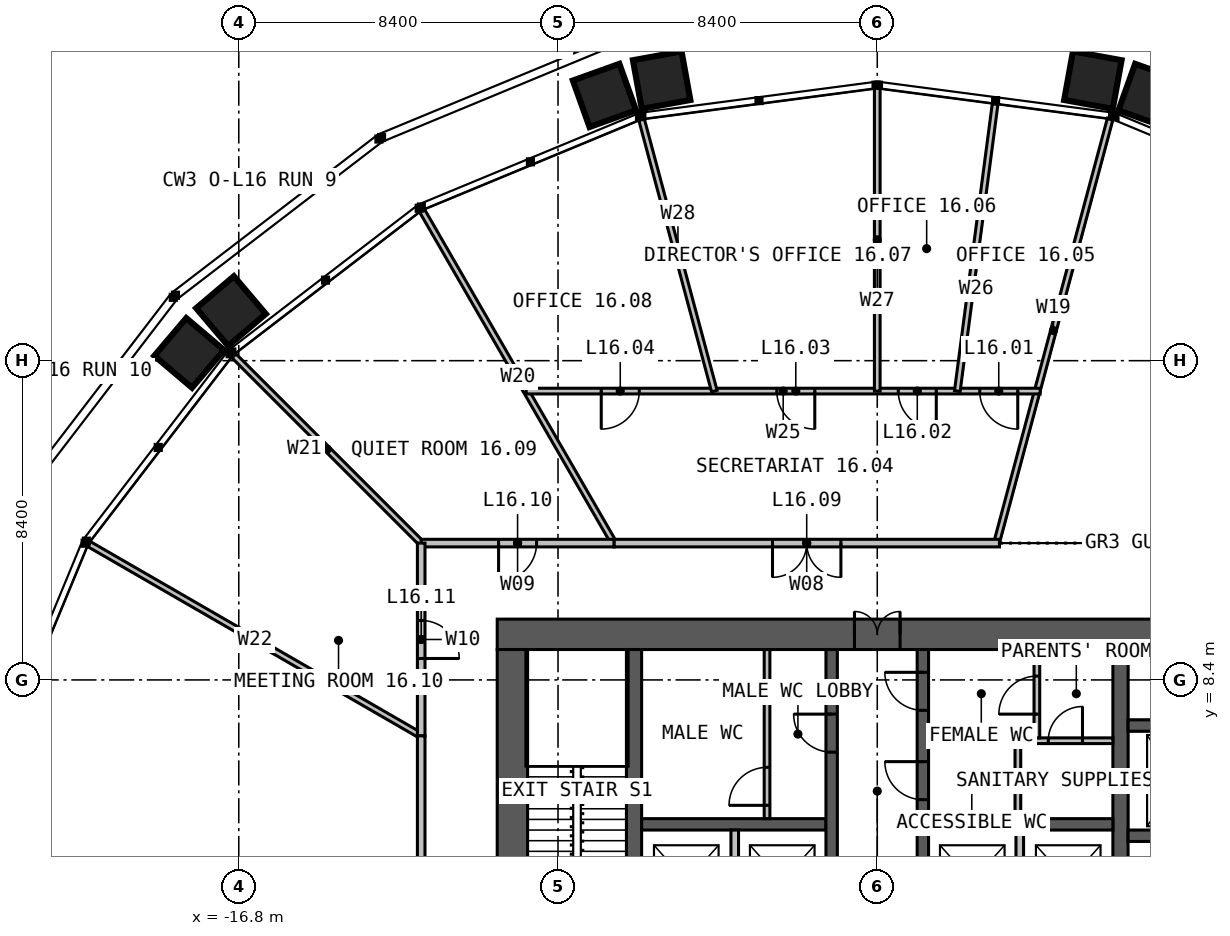
"""IFC4 building model, lengths in metres.
Left out: names, types, materials, properties, quantities, classifications, styles, units other than length and angle.
Written with IfcOpenShell. Run it as: python <this file> out.ifc"""

import sys

from ifc_helpers import new_model, si_unit, direction, frame, frame_2d, origin, place, context, subcontext, project, spatial, rectangle, extrude, element, fill, save


model = new_model("IFC4")
c1 = context("Model", 3, precision=1e-05, world=origin(), true_north=direction((0.0, 1.0)))
c2 = subcontext(c1, "Body", "Model", "MODEL_VIEW")
j1 = project(units=[si_unit("LENGTHUNIT", "METRE"), si_unit("PLANEANGLEUNIT", "RADIAN")], contexts=[c1])
p1 = place(None, origin())
s1 = spatial("IfcSite", under=j1, at=p1, CompositionType="ELEMENT")
p2 = place(p1, origin())
s2 = spatial("IfcBuilding", under=s1, at=p2, CompositionType="ELEMENT")
p3 = place(p2, frame((0.0, 0.0, 69.0)))
s3 = spatial("IfcBuildingStorey", under=s2, at=p3, CompositionType="ELEMENT", Elevation=69.0)
p4 = place(p3, frame((-10.0, 9.6, 0.0), z_axis=(0.0, 0.0, 1.0), x_axis=(1.0, 0.0, 0.0)))
e1 = element("IfcWall", 1, at=p4, inside=s3, PredefinedType="SOLIDWALL", context=c2, shape_type="SweptSolid", body=[
    extrude(rectangle(XDim=20.0, YDim=0.8, at=frame_2d((10.0, 0.0))), origin(), (0.0, 0.0, 1.0), 4.0),
])
p5 = place(p4, frame((9.4, 0.0, 0.0)))
e2 = element("IfcOpeningElement", 2, at=p5, cuts=e1, PredefinedType="OPENING", context=c2, shape_type="SweptSolid", body=[
    extrude(rectangle(XDim=1.2, YDim=2.2, at=frame_2d((0.6, 1.1))), frame((0.0, 0.41, 0.0), z_axis=(0.0, -1.0, 0.0), x_axis=(1.0, 0.0, 0.0)), (0.0, 0.0, 1.0), 0.82),
])
p6 = place(p3, frame((-9.6, 9.2, 0.0), z_axis=(0.0, 0.0, 1.0), x_axis=(0.0, -1.0, 0.0)))
e3 = element("IfcWall", 3, at=p6, inside=s3, PredefinedType="SOLIDWALL", context=c2, shape_type="SweptSolid", body=[
    extrude(rectangle(XDim=18.4, YDim=0.8, at=frame_2d((9.2, 0.0))), origin(), (0.0, 0.0, 1.0), 4.0),
])
p7 = place(p3, frame((-6.4, -9.2, 0.0), z_axis=(0.0, 0.0, 1.0), x_axis=(0.0, 1.0, 0.0)))
e4 = element("IfcWall", 4, at=p7, inside=s3, PredefinedType="SOLIDWALL", context=c2, shape_type="SweptSolid", body=[
    extrude(rectangle(XDim=18.4, YDim=0.4, at=frame_2d((9.2, 0.0))), origin(), (0.0, 0.0, 1.0), 4.0),
])
p8 = place(p7, frame((8.7, 0.0, 0.0)))
e5 = element("IfcOpeningElement", 5, at=p8, cuts=e4, PredefinedType="OPENING", context=c2, shape_type="SweptSolid", body=[
    extrude(rectangle(XDim=1.0, YDim=2.2, at=frame_2d((0.5, 1.1))), frame((0.0, 0.21, 0.0), z_axis=(0.0, -1.0, 0.0), x_axis=(1.0, 0.0, 0.0)), (0.0, 0.0, 1.0), 0.42),
])
p9 = place(p3, frame((6.4, 9.2, 0.0), z_axis=(0.0, 0.0, 1.0), x_axis=(0.0, -1.0, 0.0)))
e6 = element("IfcWall", 6, at=p9, inside=s3, PredefinedType="SOLIDWALL", context=c2, shape_type="SweptSolid", body=[
    extrude(rectangle(XDim=18.4, YDim=0.4, at=frame_2d((9.2, 0.0))), origin(), (0.0, 0.0, 1.0), 4.0),
])
p10 = place(p9, frame((8.7, 0.0, 0.0)))
e7 = element("IfcOpeningElement", 7, at=p10, cuts=e6, PredefinedType="OPENING", context=c2, shape_type="SweptSolid", body=[
    extrude(rectangle(XDim=1.0, YDim=2.2, at=frame_2d((0.5, 1.1))), frame((0.0, 0.21, 0.0), z_axis=(0.0, -1.0, 0.0), x_axis=(1.0, 0.0, 0.0)), (0.0, 0.0, 1.0), 0.42),
])
for number, where, z_axis, x_axis in (
    (8, (-6.2, 4.6, 0.0), (0.0, 0.0, 1.0), (1.0, 0.0, 0.0)),
    (9, (1.35, 4.6, 0.0), (0.0, 0.0, 1.0), (1.0, 0.0, 0.0)),
):
    element("IfcWall", number, at=place(p3, frame(where, z_axis=z_axis, x_axis=x_axis)), inside=s3, PredefinedType="SOLIDWALL", context=c2, shape_type="SweptSolid", body=[
        extrude(rectangle(XDim=4.85, YDim=0.3, at=frame_2d((2.425, 0.0))), origin(), (0.0, 0.0, 1.0), 4.0),
    ])
p11 = place(p3, frame((-1.2, 1.45, 0.0), z_axis=(0.0, 0.0, 1.0), x_axis=(0.0, 1.0, 0.0)))
e10 = element("IfcWall", 10, at=p11, inside=s3, PredefinedType="SOLIDWALL", context=c2, shape_type="SweptSolid", body=[
    extrude(rectangle(XDim=7.75, YDim=0.3, at=frame_2d((3.875, 0.0))), origin(), (0.0, 0.0, 1.0), 4.0),
])
p12 = place(p11, frame((5.05, 0.0, 0.0)))
e11 = element("IfcOpeningElement", 11, at=p12, cuts=e10, PredefinedType="OPENING", context=c2, shape_type="SweptSolid", body=[
    extrude(rectangle(XDim=1.0, YDim=2.2, at=frame_2d((0.5, 1.1))), frame((0.0, 0.16, 0.0), z_axis=(0.0, -1.0, 0.0), x_axis=(1.0, 0.0, 0.0)), (0.0, 0.0, 1.0), 0.32),
])
p13 = place(p3, frame((1.2, 1.45, 0.0), z_axis=(0.0, 0.0, 1.0), x_axis=(0.0, 1.0, 0.0)))
e12 = element("IfcWall", 12, at=p13, inside=s3, PredefinedType="SOLIDWALL", context=c2, shape_type="SweptSolid", body=[
    extrude(rectangle(XDim=7.75, YDim=0.3, at=frame_2d((3.875, 0.0))), origin(), (0.0, 0.0, 1.0), 4.0),
])
p14 = place(p13, frame((3.8, 0.0, 0.0)))
e13 = element("IfcOpeningElement", 13, at=p14, cuts=e12, PredefinedType="OPENING", context=c2, shape_type="SweptSolid", body=[
    extrude(rectangle(XDim=1.0, YDim=2.2, at=frame_2d((0.5, 1.1))), frame((0.0, 0.16, 0.0), z_axis=(0.0, -1.0, 0.0), x_axis=(1.0, 0.0, 0.0)), (0.0, 0.0, 1.0), 0.32),
])
p15 = place(p13, frame((6.15, 0.0, 0.0)))
e14 = element("IfcOpeningElement", 14, at=p15, cuts=e12, PredefinedType="OPENING", context=c2, shape_type="SweptSolid", body=[
    extrude(rectangle(XDim=1.0, YDim=2.2, at=frame_2d((0.5, 1.1))), frame((0.0, 0.16, 0.0), z_axis=(0.0, -1.0, 0.0), x_axis=(1.0, 0.0, 0.0)), (0.0, 0.0, 1.0), 0.32),
])
p16 = place(p3, frame((6.6, 4.3, 0.0), z_axis=(0.0, 0.0, 1.0), x_axis=(1.0, 0.0, 0.0)))
e15 = element("IfcWall", 15, at=p16, inside=s3, PredefinedType="SOLIDWALL", context=c2, shape_type="SweptSolid", body=[
    extrude(rectangle(XDim=2.6, YDim=0.3, at=frame_2d((1.3, 0.0))), origin(), (0.0, 0.0, 1.0), 4.0),
])
p17 = place(p16, frame((0.75, 0.0, 0.0)))
e16 = element("IfcOpeningElement", 16, at=p17, cuts=e15, PredefinedType="OPENING", context=c2, shape_type="SweptSolid", body=[
    extrude(rectangle(XDim=1.1, YDim=2.2, at=frame_2d((0.55, 1.1))), frame((0.0, 0.16, 0.0), z_axis=(0.0, -1.0, 0.0), x_axis=(1.0, 0.0, 0.0)), (0.0, 0.0, 1.0), 0.32),
])
p18 = place(p3, frame((6.6, 7.2, 0.0), z_axis=(0.0, 0.0, 1.0), x_axis=(1.0, 0.0, 0.0)))
e17 = element("IfcWall", 17, at=p18, inside=s3, PredefinedType="SOLIDWALL", context=c2, shape_type="SweptSolid", body=[
    extrude(rectangle(XDim=2.6, YDim=0.3, at=frame_2d((1.3, 0.0))), origin(), (0.0, 0.0, 1.0), 4.0),
])
for number, where, z_axis, x_axis in (
    (18, (-3.75, 1.75, 0.0), (0.0, 0.0, 1.0), (0.0, 1.0, 0.0)),
    (19, (3.75, 1.75, 0.0), (0.0, 0.0, 1.0), (0.0, 1.0, 0.0)),
):
    element("IfcWall", number, at=place(p3, frame(where, z_axis=z_axis, x_axis=x_axis)), inside=s3, PredefinedType="SOLIDWALL", context=c2, shape_type="SweptSolid", body=[
        extrude(rectangle(XDim=2.7, YDim=0.2, at=frame_2d((1.35, 0.0))), origin(), (0.0, 0.0, 1.0), 3.75),
    ])
p19 = place(p3, frame((1.35, 6.8, 0.0), z_axis=(0.0, 0.0, 1.0), x_axis=(1.0, 0.0, 0.0)))
e20 = element("IfcWall", 20, at=p19, inside=s3, PredefinedType="PARTITIONING", context=c2, shape_type="SweptSolid", body=[
    extrude(rectangle(XDim=4.85, YDim=0.15, at=frame_2d((2.425, 0.0))), origin(), (0.0, 0.0, 1.0), 3.75),
])
p20 = place(p19, frame((3.15, 0.0, 0.0)))
e21 = element("IfcOpeningElement", 21, at=p20, cuts=e20, PredefinedType="OPENING", context=c2, shape_type="SweptSolid", body=[
    extrude(rectangle(XDim=0.9, YDim=2.2, at=frame_2d((0.45, 1.1))), frame((0.0, 0.085, 0.0), z_axis=(0.0, -1.0, 0.0), x_axis=(1.0, 0.0, 0.0)), (0.0, 0.0, 1.0), 0.17),
])
p21 = place(p3, frame((3.7, 4.75, 0.0), z_axis=(0.0, 0.0, 1.0), x_axis=(0.0, 1.0, 0.0)))
e22 = element("IfcWall", 22, at=p21, inside=s3, PredefinedType="PARTITIONING", context=c2, shape_type="SweptSolid", body=[
    extrude(rectangle(XDim=1.975, YDim=0.15, at=frame_2d((0.988, 0.0))), origin(), (0.0, 0.0, 1.0), 3.75),
])
p22 = place(p3, frame((4.2, 6.875, 0.0), z_axis=(0.0, 0.0, 1.0), x_axis=(0.0, 1.0, 0.0)))
e23 = element("IfcWall", 23, at=p22, inside=s3, PredefinedType="PARTITIONING", context=c2, shape_type="SweptSolid", body=[
    extrude(rectangle(XDim=2.325, YDim=0.15, at=frame_2d((1.163, 0.0))), origin(), (0.0, 0.0, 1.0), 3.75),
])
p23 = place(p22, frame((0.625, 0.0, 0.0)))
e24 = element("IfcOpeningElement", 24, at=p23, cuts=e23, PredefinedType="OPENING", context=c2, shape_type="SweptSolid", body=[
    extrude(rectangle(XDim=1.0, YDim=2.2, at=frame_2d((0.5, 1.1))), frame((0.0, 0.085, 0.0), z_axis=(0.0, -1.0, 0.0), x_axis=(1.0, 0.0, 0.0)), (0.0, 0.0, 1.0), 0.17),
])
p24 = place(p3, frame((-2.9, 4.75, 0.0), z_axis=(0.0, 0.0, 1.0), x_axis=(0.0, 1.0, 0.0)))
e25 = element("IfcWall", 25, at=p24, inside=s3, PredefinedType="PARTITIONING", context=c2, shape_type="SweptSolid", body=[
    extrude(rectangle(XDim=4.45, YDim=0.15, at=frame_2d((2.225, 0.0))), origin(), (0.0, 0.0, 1.0), 3.75),
])
p25 = place(p24, frame((0.35, 0.0, 0.0)))
e26 = element("IfcOpeningElement", 26, at=p25, cuts=e25, PredefinedType="OPENING", context=c2, shape_type="SweptSolid", body=[
    extrude(rectangle(XDim=1.0, YDim=2.2, at=frame_2d((0.5, 1.1))), frame((0.0, 0.085, 0.0), z_axis=(0.0, -1.0, 0.0), x_axis=(1.0, 0.0, 0.0)), (0.0, 0.0, 1.0), 0.17),
])
p26 = place(p3, frame((3.143, 12.02, 0.0), z_axis=(0.0, 0.0, 1.0), x_axis=(0.258810822254, 0.965928029557, 0.0)))
e27 = element("IfcWall", 27, at=p26, inside=s3, PredefinedType="PARTITIONING", context=c2, shape_type="SweptSolid", body=[
    extrude(rectangle(XDim=11.539, YDim=0.15, at=frame_2d((5.769, 0.0))), origin(), (0.0, 0.0, 1.0), 2.79),
])
p27 = place(p3, frame((-6.928, 12.0, 0.0), z_axis=(0.0, 0.0, 1.0), x_axis=(-0.500002673408, 0.866023860286, 0.0)))
e28 = element("IfcWall", 28, at=p27, inside=s3, PredefinedType="PARTITIONING", context=c2, shape_type="SweptSolid", body=[
    extrude(rectangle(XDim=10.106, YDim=0.15, at=frame_2d((5.053, 0.0))), origin(), (0.0, 0.0, 1.0), 2.79),
])
p28 = place(p3, frame((-12.0, 12.0, 0.0), z_axis=(0.0, 0.0, 1.0), x_axis=(-0.707106781187, 0.707106781187, 0.0)))
e29 = element("IfcWall", 29, at=p28, inside=s3, PredefinedType="PARTITIONING", context=c2, shape_type="SweptSolid", body=[
    extrude(rectangle(XDim=6.992, YDim=0.15, at=frame_2d((3.496, 0.0))), origin(), (0.0, 0.0, 1.0), 2.79),
])
p29 = place(p3, frame((-12.0, 6.928, 0.0), z_axis=(0.0, 0.0, 1.0), x_axis=(-0.866023860286, 0.500002673408, 0.0)))
e30 = element("IfcWall", 30, at=p29, inside=s3, PredefinedType="PARTITIONING", context=c2, shape_type="SweptSolid", body=[
    extrude(rectangle(XDim=10.106, YDim=0.15, at=frame_2d((5.053, 0.0))), origin(), (0.0, 0.0, 1.0), 2.79),
])
p30 = place(p3, frame((4.287, 16.0, 0.0), z_axis=(0.0, 0.0, 1.0), x_axis=(-1.0, 0.0, 0.0)))
e31 = element("IfcWall", 31, at=p30, inside=s3, PredefinedType="PARTITIONING", context=c2, shape_type="SweptSolid", body=[
    extrude(rectangle(XDim=13.525, YDim=0.15, at=frame_2d((6.762, 0.0))), origin(), (0.0, 0.0, 1.0), 2.79),
])
p31 = place(p30, frame((0.59, 0.0, 0.0)))
e32 = element("IfcOpeningElement", 32, at=p31, cuts=e31, PredefinedType="OPENING", context=c2, shape_type="SweptSolid", body=[
    extrude(rectangle(XDim=1.0, YDim=2.2, at=frame_2d((0.5, 1.1))), frame((0.0, 0.085, 0.0), z_axis=(0.0, -1.0, 0.0), x_axis=(1.0, 0.0, 0.0)), (0.0, 0.0, 1.0), 0.17),
])
p32 = place(p30, frame((2.734, 0.0, 0.0)))
e33 = element("IfcOpeningElement", 33, at=p32, cuts=e31, PredefinedType="OPENING", context=c2, shape_type="SweptSolid", body=[
    extrude(rectangle(XDim=1.0, YDim=2.2, at=frame_2d((0.5, 1.1))), frame((0.0, 0.085, 0.0), z_axis=(0.0, -1.0, 0.0), x_axis=(1.0, 0.0, 0.0)), (0.0, 0.0, 1.0), 0.17),
])
p33 = place(p30, frame((5.931, 0.0, 0.0)))
e34 = element("IfcOpeningElement", 34, at=p33, cuts=e31, PredefinedType="OPENING", context=c2, shape_type="SweptSolid", body=[
    extrude(rectangle(XDim=1.0, YDim=2.2, at=frame_2d((0.5, 1.1))), frame((0.0, 0.085, 0.0), z_axis=(0.0, -1.0, 0.0), x_axis=(1.0, 0.0, 0.0)), (0.0, 0.0, 1.0), 0.17),
])
p34 = place(p30, frame((10.55, 0.0, 0.0)))
e35 = element("IfcOpeningElement", 35, at=p34, cuts=e31, PredefinedType="OPENING", context=c2, shape_type="SweptSolid", body=[
    extrude(rectangle(XDim=1.0, YDim=2.2, at=frame_2d((0.5, 1.1))), frame((0.0, 0.085, 0.0), z_axis=(0.0, -1.0, 0.0), x_axis=(1.0, 0.0, 0.0)), (0.0, 0.0, 1.0), 0.17),
])
p35 = place(p3, frame((2.106, 16.0, 0.0), z_axis=(0.0, 0.0, 1.0), x_axis=(0.130511705759, 0.991446768445, 0.0)))
e36 = element("IfcWall", 36, at=p35, inside=s3, PredefinedType="PARTITIONING", context=c2, shape_type="SweptSolid", body=[
    extrude(rectangle(XDim=7.619, YDim=0.15, at=frame_2d((3.81, 0.0))), origin(), (0.0, 0.0, 1.0), 2.79),
])
p36 = place(p3, frame((0.0, 16.0, 0.0), z_axis=(0.0, 0.0, 1.0), x_axis=(0.0, 1.0, 0.0)))
e37 = element("IfcWall", 37, at=p36, inside=s3, PredefinedType="PARTITIONING", context=c2, shape_type="SweptSolid", body=[
    extrude(rectangle(XDim=7.962, YDim=0.15, at=frame_2d((3.981, 0.0))), origin(), (0.0, 0.0, 1.0), 2.79),
])
p37 = place(p3, frame((-4.287, 16.0, 0.0), z_axis=(0.0, 0.0, 1.0), x_axis=(-0.258831210147, 0.965922566593, 0.0)))
e38 = element("IfcWall", 38, at=p37, inside=s3, PredefinedType="PARTITIONING", context=c2, shape_type="SweptSolid", body=[
    extrude(rectangle(XDim=7.398, YDim=0.15, at=frame_2d((3.699, 0.0))), origin(), (0.0, 0.0, 1.0), 2.79),
])
p38 = place(p3, frame((3.215, 12.0, 0.0), z_axis=(0.0, 0.0, 1.0), x_axis=(-1.0, 0.0, 0.0)))
e39 = element("IfcWall", 39, at=p38, inside=s3, PredefinedType="PARTITIONING", context=c2, shape_type="SweptSolid", body=[
    extrude(rectangle(XDim=10.144, YDim=0.2, at=frame_2d((5.072, 0.0))), origin(), (0.0, 0.0, 1.0), 3.8),
])
p39 = place(p38, frame((4.172, 0.0, 0.0)))
e40 = element("IfcOpeningElement", 40, at=p39, cuts=e39, PredefinedType="OPENING", context=c2, shape_type="SweptSolid", body=[
    extrude(rectangle(XDim=1.8, YDim=2.2, at=frame_2d((0.9, 1.1))), frame((0.0, 0.11, 0.0), z_axis=(0.0, -1.0, 0.0), x_axis=(1.0, 0.0, 0.0)), (0.0, 0.0, 1.0), 0.22),
])
p40 = place(p3, frame((-6.928, 12.0, 0.0), z_axis=(0.0, 0.0, 1.0), x_axis=(-1.0, 0.0, 0.0)))
e41 = element("IfcWall", 41, at=p40, inside=s3, PredefinedType="PARTITIONING", context=c2, shape_type="SweptSolid", body=[
    extrude(rectangle(XDim=5.072, YDim=0.2, at=frame_2d((2.536, 0.0))), origin(), (0.0, 0.0, 1.0), 3.8),
])
p41 = place(p40, frame((2.036, 0.0, 0.0)))
e42 = element("IfcOpeningElement", 42, at=p41, cuts=e41, PredefinedType="OPENING", context=c2, shape_type="SweptSolid", body=[
    extrude(rectangle(XDim=1.0, YDim=2.2, at=frame_2d((0.5, 1.1))), frame((0.0, 0.11, 0.0), z_axis=(0.0, -1.0, 0.0), x_axis=(1.0, 0.0, 0.0)), (0.0, 0.0, 1.0), 0.22),
])
p42 = place(p3, frame((-12.0, 12.0, 0.0), z_axis=(0.0, 0.0, 1.0), x_axis=(0.0, -1.0, 0.0)))
e43 = element("IfcWall", 43, at=p42, inside=s3, PredefinedType="PARTITIONING", context=c2, shape_type="SweptSolid", body=[
    extrude(rectangle(XDim=5.072, YDim=0.2, at=frame_2d((2.536, 0.0))), origin(), (0.0, 0.0, 1.0), 3.8),
])
p43 = place(p42, frame((2.036, 0.0, 0.0)))
e44 = element("IfcOpeningElement", 44, at=p43, cuts=e43, PredefinedType="OPENING", context=c2, shape_type="SweptSolid", body=[
    extrude(rectangle(XDim=1.0, YDim=2.2, at=frame_2d((0.5, 1.1))), frame((0.0, 0.11, 0.0), z_axis=(0.0, -1.0, 0.0), x_axis=(1.0, 0.0, 0.0)), (0.0, 0.0, 1.0), 0.22),
])
p44 = place(p3, frame((-12.0, 6.928, 0.0), z_axis=(0.0, 0.0, 1.0), x_axis=(0.0, -1.0, 0.0)))
e45 = element("IfcWall", 45, at=p44, inside=s3, PredefinedType="PARTITIONING", context=c2, shape_type="SweptSolid", body=[
    extrude(rectangle(XDim=13.856, YDim=0.2, at=frame_2d((6.928, 0.0))), origin(), (0.0, 0.0, 1.0), 3.8),
])
p45 = place(p44, frame((6.028, 0.0, 0.0)))
e46 = element("IfcOpeningElement", 46, at=p45, cuts=e45, PredefinedType="OPENING", context=c2, shape_type="SweptSolid", body=[
    extrude(rectangle(XDim=1.8, YDim=2.2, at=frame_2d((0.9, 1.1))), frame((0.0, 0.11, 0.0), z_axis=(0.0, -1.0, 0.0), x_axis=(1.0, 0.0, 0.0)), (0.0, 0.0, 1.0), 0.22),
])
p46 = place(p5, origin())
e47 = element("IfcDoor", 47, at=p46, inside=s3, OperationType="DOUBLE_DOOR_SINGLE_SWING", PredefinedType="DOOR", context=c2, shape_type="SweptSolid", body=[
    extrude(rectangle(XDim=1.2, YDim=2.2, at=frame_2d((0.6, 1.1))), frame((0.0, 0.025, 0.0), z_axis=(0.0, -1.0, 0.0), x_axis=(1.0, 0.0, 0.0)), (0.0, 0.0, 1.0), 0.05),
])
fill(e2, e47)
p47 = place(p12, origin())
e48 = element("IfcDoor", 48, at=p47, inside=s3, OperationType="SINGLE_SWING_RIGHT", PredefinedType="DOOR", context=c2, shape_type="SweptSolid", body=[
    extrude(rectangle(XDim=1.0, YDim=2.2, at=frame_2d((0.5, 1.1))), frame((0.0, 0.025, 0.0), z_axis=(0.0, -1.0, 0.0), x_axis=(1.0, 0.0, 0.0)), (0.0, 0.0, 1.0), 0.05),
])
fill(e11, e48)
p48 = place(p14, origin())
e49 = element("IfcDoor", 49, at=p48, inside=s3, OperationType="SINGLE_SWING_RIGHT", PredefinedType="DOOR", context=c2, shape_type="SweptSolid", body=[
    extrude(rectangle(XDim=1.0, YDim=2.2, at=frame_2d((0.5, 1.1))), frame((0.0, 0.025, 0.0), z_axis=(0.0, -1.0, 0.0), x_axis=(1.0, 0.0, 0.0)), (0.0, 0.0, 1.0), 0.05),
])
fill(e13, e49)
p49 = place(p15, origin())
e50 = element("IfcDoor", 50, at=p49, inside=s3, OperationType="SINGLE_SWING_RIGHT", PredefinedType="DOOR", context=c2, shape_type="SweptSolid", body=[
    extrude(rectangle(XDim=1.0, YDim=2.2, at=frame_2d((0.5, 1.1))), frame((0.0, 0.025, 0.0), z_axis=(0.0, -1.0, 0.0), x_axis=(1.0, 0.0, 0.0)), (0.0, 0.0, 1.0), 0.05),
])
fill(e14, e50)
p50 = place(p20, origin())
e51 = element("IfcDoor", 51, at=p50, inside=s3, OperationType="SINGLE_SWING_RIGHT", PredefinedType="DOOR", context=c2, shape_type="SweptSolid", body=[
    extrude(rectangle(XDim=0.9, YDim=2.2, at=frame_2d((0.45, 1.1))), frame((0.0, 0.025, 0.0), z_axis=(0.0, -1.0, 0.0), x_axis=(1.0, 0.0, 0.0)), (0.0, 0.0, 1.0), 0.05),
])
fill(e21, e51)
p51 = place(p23, origin())
e52 = element("IfcDoor", 52, at=p51, inside=s3, OperationType="SINGLE_SWING_LEFT", PredefinedType="DOOR", context=c2, shape_type="SweptSolid", body=[
    extrude(rectangle(XDim=1.0, YDim=2.2, at=frame_2d((0.5, 1.1))), frame((0.0, 0.025, 0.0), z_axis=(0.0, -1.0, 0.0), x_axis=(1.0, 0.0, 0.0)), (0.0, 0.0, 1.0), 0.05),
])
fill(e24, e52)
p52 = place(p25, origin())
e53 = element("IfcDoor", 53, at=p52, inside=s3, OperationType="SINGLE_SWING_LEFT", PredefinedType="DOOR", context=c2, shape_type="SweptSolid", body=[
    extrude(rectangle(XDim=1.0, YDim=2.2, at=frame_2d((0.5, 1.1))), frame((0.0, 0.025, 0.0), z_axis=(0.0, -1.0, 0.0), x_axis=(1.0, 0.0, 0.0)), (0.0, 0.0, 1.0), 0.05),
])
fill(e26, e53)
p53 = place(p31, origin())
e54 = element("IfcDoor", 54, at=p53, inside=s3, OperationType="SINGLE_SWING_LEFT", PredefinedType="DOOR", context=c2, shape_type="SweptSolid", body=[
    extrude(rectangle(XDim=1.0, YDim=2.2, at=frame_2d((0.5, 1.1))), frame((0.0, 0.025, 0.0), z_axis=(0.0, -1.0, 0.0), x_axis=(1.0, 0.0, 0.0)), (0.0, 0.0, 1.0), 0.05),
])
fill(e32, e54)
p54 = place(p32, origin())
e55 = element("IfcDoor", 55, at=p54, inside=s3, OperationType="SINGLE_SWING_LEFT", PredefinedType="DOOR", context=c2, shape_type="SweptSolid", body=[
    extrude(rectangle(XDim=1.0, YDim=2.2, at=frame_2d((0.5, 1.1))), frame((0.0, 0.025, 0.0), z_axis=(0.0, -1.0, 0.0), x_axis=(1.0, 0.0, 0.0)), (0.0, 0.0, 1.0), 0.05),
])
fill(e33, e55)
p55 = place(p33, origin())
e56 = element("IfcDoor", 56, at=p55, inside=s3, OperationType="SINGLE_SWING_LEFT", PredefinedType="DOOR", context=c2, shape_type="SweptSolid", body=[
    extrude(rectangle(XDim=1.0, YDim=2.2, at=frame_2d((0.5, 1.1))), frame((0.0, 0.025, 0.0), z_axis=(0.0, -1.0, 0.0), x_axis=(1.0, 0.0, 0.0)), (0.0, 0.0, 1.0), 0.05),
])
fill(e34, e56)
p56 = place(p34, origin())
e57 = element("IfcDoor", 57, at=p56, inside=s3, OperationType="SINGLE_SWING_RIGHT", PredefinedType="DOOR", context=c2, shape_type="SweptSolid", body=[
    extrude(rectangle(XDim=1.0, YDim=2.2, at=frame_2d((0.5, 1.1))), frame((0.0, 0.025, 0.0), z_axis=(0.0, -1.0, 0.0), x_axis=(1.0, 0.0, 0.0)), (0.0, 0.0, 1.0), 0.05),
])
fill(e35, e57)
p57 = place(p39, origin())
e58 = element("IfcDoor", 58, at=p57, inside=s3, OperationType="DOUBLE_DOOR_SINGLE_SWING", PredefinedType="DOOR", context=c2, shape_type="SweptSolid", body=[
    extrude(rectangle(XDim=1.8, YDim=2.2, at=frame_2d((0.9, 1.1))), frame((0.0, 0.025, 0.0), z_axis=(0.0, -1.0, 0.0), x_axis=(1.0, 0.0, 0.0)), (0.0, 0.0, 1.0), 0.05),
])
fill(e40, e58)
p58 = place(p41, origin())
e59 = element("IfcDoor", 59, at=p58, inside=s3, OperationType="SINGLE_SWING_RIGHT", PredefinedType="DOOR", context=c2, shape_type="SweptSolid", body=[
    extrude(rectangle(XDim=1.0, YDim=2.2, at=frame_2d((0.5, 1.1))), frame((0.0, 0.025, 0.0), z_axis=(0.0, -1.0, 0.0), x_axis=(1.0, 0.0, 0.0)), (0.0, 0.0, 1.0), 0.05),
])
fill(e42, e59)
p59 = place(p43, origin())
e60 = element("IfcDoor", 60, at=p59, inside=s3, OperationType="SINGLE_SWING_RIGHT", PredefinedType="DOOR", context=c2, shape_type="SweptSolid", body=[
    extrude(rectangle(XDim=1.0, YDim=2.2, at=frame_2d((0.5, 1.1))), frame((0.0, 0.025, 0.0), z_axis=(0.0, -1.0, 0.0), x_axis=(1.0, 0.0, 0.0)), (0.0, 0.0, 1.0), 0.05),
])
fill(e44, e60)
save(model, sys.argv[1])
